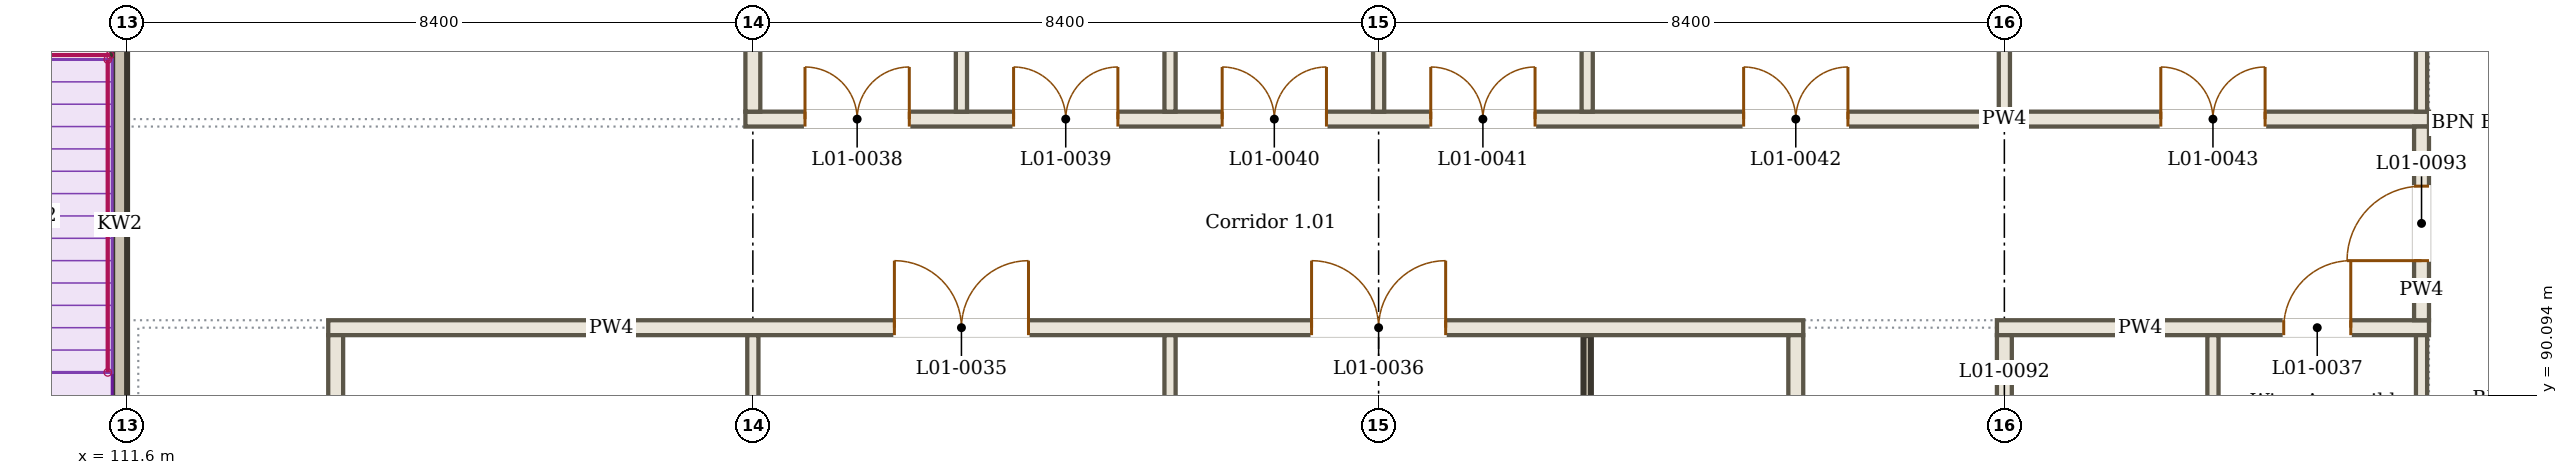
"""IFC4 building model, lengths in metres.
Left out: names, types, materials, properties, quantities, classifications, styles, units other than length and angle.
Written with IfcOpenShell. Run it as: python <this file> out.ifc"""

import sys

from ifc_helpers import new_model, si_unit, direction, frame, frame_2d, origin, place, context, subcontext, project, spatial, rectangle, extrude, element, fill, save


model = new_model("IFC4")
c1 = context("Model", 3, precision=1e-05, world=origin(), true_north=direction((0.0, 1.0)))
c2 = subcontext(c1, "Body", "Model", "MODEL_VIEW")
j1 = project(units=[si_unit("LENGTHUNIT", "METRE"), si_unit("PLANEANGLEUNIT", "RADIAN")], contexts=[c1])
p1 = place(None, origin())
s1 = spatial("IfcSite", under=j1, at=p1, CompositionType="ELEMENT")
p2 = place(p1, origin())
s2 = spatial("IfcBuilding", under=s1, at=p2, CompositionType="ELEMENT")
p3 = place(p2, frame((0.0, 0.0, 4.5)))
s3 = spatial("IfcBuildingStorey", under=s2, at=p3, CompositionType="ELEMENT", Elevation=4.5)
p4 = place(p3, frame((114.3, 91.0, 0.0), z_axis=(0.0, 0.0, 1.0), x_axis=(1.0, 0.0, 0.0)))
e1 = element("IfcWall", 1, at=p4, inside=s3, PredefinedType="PARTITIONING", context=c2, shape_type="SweptSolid", body=[
    extrude(rectangle(XDim=19.8, YDim=0.2, at=frame_2d((9.9, 0.0))), origin(), (0.0, 0.0, 1.0), 3.8),
])
p5 = place(p4, frame((7.6, 0.0, 0.0)))
e2 = element("IfcOpeningElement", 2, at=p5, cuts=e1, PredefinedType="OPENING", context=c2, shape_type="SweptSolid", body=[
    extrude(rectangle(XDim=1.8, YDim=2.1, at=frame_2d((0.9, 1.05))), frame((0.0, 0.11, 0.0), z_axis=(0.0, -1.0, 0.0), x_axis=(1.0, 0.0, 0.0)), (0.0, 0.0, 1.0), 0.22),
])
p6 = place(p4, frame((13.2, 0.0, 0.0)))
e3 = element("IfcOpeningElement", 3, at=p6, cuts=e1, PredefinedType="OPENING", context=c2, shape_type="SweptSolid", body=[
    extrude(rectangle(XDim=1.8, YDim=2.1, at=frame_2d((0.9, 1.05))), frame((0.0, 0.11, 0.0), z_axis=(0.0, -1.0, 0.0), x_axis=(1.0, 0.0, 0.0)), (0.0, 0.0, 1.0), 0.22),
])
p7 = place(p3, frame((136.7, 91.0, 0.0), z_axis=(0.0, 0.0, 1.0), x_axis=(1.0, 0.0, 0.0)))
e4 = element("IfcWall", 4, at=p7, inside=s3, PredefinedType="PARTITIONING", context=c2, shape_type="SweptSolid", body=[
    extrude(rectangle(XDim=5.8, YDim=0.2, at=frame_2d((2.9, 0.0))), origin(), (0.0, 0.0, 1.0), 3.8),
])
p8 = place(p7, frame((3.85, 0.0, 0.0)))
e5 = element("IfcOpeningElement", 5, at=p8, cuts=e4, PredefinedType="OPENING", context=c2, shape_type="SweptSolid", body=[
    extrude(rectangle(XDim=0.9, YDim=2.1, at=frame_2d((0.45, 1.05))), frame((0.0, 0.11, 0.0), z_axis=(0.0, -1.0, 0.0), x_axis=(1.0, 0.0, 0.0)), (0.0, 0.0, 1.0), 0.22),
])
p9 = place(p3, frame((119.9, 93.8, 0.0), z_axis=(0.0, 0.0, 1.0), x_axis=(1.0, 0.0, 0.0)))
e6 = element("IfcWall", 6, at=p9, inside=s3, PredefinedType="PARTITIONING", context=c2, shape_type="SweptSolid", body=[
    extrude(rectangle(XDim=22.6, YDim=0.2, at=frame_2d((11.3, 0.0))), origin(), (0.0, 0.0, 1.0), 3.8),
])
p10 = place(p9, frame((0.8, 0.0, 0.0)))
e7 = element("IfcOpeningElement", 7, at=p10, cuts=e6, PredefinedType="OPENING", context=c2, shape_type="SweptSolid", body=[
    extrude(rectangle(XDim=1.4, YDim=2.1, at=frame_2d((0.7, 1.05))), frame((0.0, 0.11, 0.0), z_axis=(0.0, -1.0, 0.0), x_axis=(1.0, 0.0, 0.0)), (0.0, 0.0, 1.0), 0.22),
])
p11 = place(p9, frame((3.6, 0.0, 0.0)))
e8 = element("IfcOpeningElement", 8, at=p11, cuts=e6, PredefinedType="OPENING", context=c2, shape_type="SweptSolid", body=[
    extrude(rectangle(XDim=1.4, YDim=2.1, at=frame_2d((0.7, 1.05))), frame((0.0, 0.11, 0.0), z_axis=(0.0, -1.0, 0.0), x_axis=(1.0, 0.0, 0.0)), (0.0, 0.0, 1.0), 0.22),
])
p12 = place(p9, frame((6.4, 0.0, 0.0)))
e9 = element("IfcOpeningElement", 9, at=p12, cuts=e6, PredefinedType="OPENING", context=c2, shape_type="SweptSolid", body=[
    extrude(rectangle(XDim=1.4, YDim=2.1, at=frame_2d((0.7, 1.05))), frame((0.0, 0.11, 0.0), z_axis=(0.0, -1.0, 0.0), x_axis=(1.0, 0.0, 0.0)), (0.0, 0.0, 1.0), 0.22),
])
p13 = place(p9, frame((9.2, 0.0, 0.0)))
e10 = element("IfcOpeningElement", 10, at=p13, cuts=e6, PredefinedType="OPENING", context=c2, shape_type="SweptSolid", body=[
    extrude(rectangle(XDim=1.4, YDim=2.1, at=frame_2d((0.7, 1.05))), frame((0.0, 0.11, 0.0), z_axis=(0.0, -1.0, 0.0), x_axis=(1.0, 0.0, 0.0)), (0.0, 0.0, 1.0), 0.22),
])
p14 = place(p9, frame((13.4, 0.0, 0.0)))
e11 = element("IfcOpeningElement", 11, at=p14, cuts=e6, PredefinedType="OPENING", context=c2, shape_type="SweptSolid", body=[
    extrude(rectangle(XDim=1.4, YDim=2.1, at=frame_2d((0.7, 1.05))), frame((0.0, 0.11, 0.0), z_axis=(0.0, -1.0, 0.0), x_axis=(1.0, 0.0, 0.0)), (0.0, 0.0, 1.0), 0.22),
])
p15 = place(p9, frame((19.0, 0.0, 0.0)))
e12 = element("IfcOpeningElement", 12, at=p15, cuts=e6, PredefinedType="OPENING", context=c2, shape_type="SweptSolid", body=[
    extrude(rectangle(XDim=1.4, YDim=2.1, at=frame_2d((0.7, 1.05))), frame((0.0, 0.11, 0.0), z_axis=(0.0, -1.0, 0.0), x_axis=(1.0, 0.0, 0.0)), (0.0, 0.0, 1.0), 0.22),
])
p16 = place(p3, frame((114.4, 79.95, 0.0), z_axis=(0.0, 0.0, 1.0), x_axis=(0.0, 1.0, 0.0)))
e13 = element("IfcWall", 13, at=p16, inside=s3, PredefinedType="PARTITIONING", context=c2, shape_type="SweptSolid", body=[
    extrude(rectangle(XDim=10.95, YDim=0.2, at=frame_2d((5.475, 0.0))), origin(), (0.0, 0.0, 1.0), 3.8),
])
p17 = place(p16, frame((4.95, 0.0, 0.0)))
e14 = element("IfcOpeningElement", 14, at=p17, cuts=e13, PredefinedType="OPENING", context=c2, shape_type="SweptSolid", body=[
    extrude(rectangle(XDim=1.0, YDim=2.1, at=frame_2d((0.5, 1.05))), frame((0.0, 0.11, 0.0), z_axis=(0.0, -1.0, 0.0), x_axis=(1.0, 0.0, 0.0)), (0.0, 0.0, 1.0), 0.22),
])
p18 = place(p3, frame((120.0, 88.397, 0.0), z_axis=(0.0, 0.0, 1.0), x_axis=(0.0, 1.0, 0.0)))
e15 = element("IfcWall", 15, at=p18, inside=s3, PredefinedType="PARTITIONING", context=c2, shape_type="SweptSolid", body=[
    extrude(rectangle(XDim=2.502, YDim=0.15, at=frame_2d((1.251, 0.0))), origin(), (0.0, 0.0, 1.0), 3.8),
])
p19 = place(p3, frame((120.0, 93.9, 0.0), z_axis=(0.0, 0.0, 1.0), x_axis=(0.0, 1.0, 0.0)))
e16 = element("IfcWall", 16, at=p19, inside=s3, PredefinedType="PARTITIONING", context=c2, shape_type="SweptSolid", body=[
    extrude(rectangle(XDim=2.7, YDim=0.2, at=frame_2d((1.35, 0.0))), origin(), (0.0, 0.0, 1.0), 3.8),
])
for number, where, z_axis, x_axis in (
    (17, (122.8, 93.9, 0.0), (0.0, 0.0, 1.0), (0.0, 1.0, 0.0)),
    (18, (125.6, 80.025, 0.0), (0.0, 0.0, 1.0), (0.0, 1.0, 0.0)),
    (19, (125.6, 93.9, 0.0), (0.0, 0.0, 1.0), (0.0, 1.0, 0.0)),
):
    element("IfcWall", number, at=place(p3, frame(where, z_axis=z_axis, x_axis=x_axis)), inside=s3, PredefinedType="PARTITIONING", context=c2, shape_type="SweptSolid", body=[
        extrude(rectangle(XDim=10.875, YDim=0.15, at=frame_2d((5.438, 0.0))), origin(), (0.0, 0.0, 1.0), 3.8),
    ])
p20 = place(p3, frame((128.4, 93.9, 0.0), z_axis=(0.0, 0.0, 1.0), x_axis=(0.0, 1.0, 0.0)))
e20 = element("IfcWall", 20, at=p20, inside=s3, PredefinedType="PARTITIONING", context=c2, shape_type="SweptSolid", body=[
    extrude(rectangle(XDim=2.503, YDim=0.15, at=frame_2d((1.251, 0.0))), origin(), (0.0, 0.0, 1.0), 3.8),
])
p21 = place(p3, frame((131.2, 79.95, 0.0), z_axis=(0.0, 0.0, 1.0), x_axis=(0.0, 1.0, 0.0)))
e21 = element("IfcWall", 21, at=p21, inside=s3, PredefinedType="SOLIDWALL", context=c2, shape_type="SweptSolid", body=[
    extrude(rectangle(XDim=10.95, YDim=0.1, at=frame_2d((5.475, 0.0))), origin(), (0.0, 0.0, 1.0), 3.8),
])
p22 = place(p3, frame((131.2, 93.9, 0.0), z_axis=(0.0, 0.0, 1.0), x_axis=(0.0, 1.0, 0.0)))
e22 = element("IfcWall", 22, at=p22, inside=s3, PredefinedType="PARTITIONING", context=c2, shape_type="SweptSolid", body=[
    extrude(rectangle(XDim=10.875, YDim=0.15, at=frame_2d((5.438, 0.0))), origin(), (0.0, 0.0, 1.0), 3.8),
])
p23 = place(p3, frame((134.0, 79.95, 0.0), z_axis=(0.0, 0.0, 1.0), x_axis=(0.0, 1.0, 0.0)))
e23 = element("IfcWall", 23, at=p23, inside=s3, PredefinedType="PARTITIONING", context=c2, shape_type="SweptSolid", body=[
    extrude(rectangle(XDim=10.95, YDim=0.2, at=frame_2d((5.475, 0.0))), origin(), (0.0, 0.0, 1.0), 3.8),
])
p24 = place(p23, frame((5.05, 0.0, 0.0)))
e24 = element("IfcOpeningElement", 24, at=p24, cuts=e23, PredefinedType="OPENING", context=c2, shape_type="SweptSolid", body=[
    extrude(rectangle(XDim=0.8, YDim=2.1, at=frame_2d((0.4, 1.05))), frame((0.0, 0.11, 0.0), z_axis=(0.0, -1.0, 0.0), x_axis=(1.0, 0.0, 0.0)), (0.0, 0.0, 1.0), 0.22),
])
p25 = place(p3, frame((136.8, 88.2, 0.0), z_axis=(0.0, 0.0, 1.0), x_axis=(0.0, 1.0, 0.0)))
e25 = element("IfcWall", 25, at=p25, inside=s3, PredefinedType="PARTITIONING", context=c2, shape_type="SweptSolid", body=[
    extrude(rectangle(XDim=2.7, YDim=0.2, at=frame_2d((1.35, 0.0))), origin(), (0.0, 0.0, 1.0), 3.8),
])
p26 = place(p25, frame((0.95, 0.0, 0.0)))
e26 = element("IfcOpeningElement", 26, at=p26, cuts=e25, PredefinedType="OPENING", context=c2, shape_type="SweptSolid", body=[
    extrude(rectangle(XDim=0.9, YDim=2.1, at=frame_2d((0.45, 1.05))), frame((0.0, 0.11, 0.0), z_axis=(0.0, -1.0, 0.0), x_axis=(1.0, 0.0, 0.0)), (0.0, 0.0, 1.0), 0.22),
])
p27 = place(p3, frame((136.8, 93.9, 0.0), z_axis=(0.0, 0.0, 1.0), x_axis=(0.0, 1.0, 0.0)))
e27 = element("IfcWall", 27, at=p27, inside=s3, PredefinedType="PARTITIONING", context=c2, shape_type="SweptSolid", body=[
    extrude(rectangle(XDim=2.503, YDim=0.15, at=frame_2d((1.251, 0.0))), origin(), (0.0, 0.0, 1.0), 3.8),
])
for number, where, z_axis, x_axis in (
    (28, (139.6, 88.2, 0.0), (0.0, 0.0, 1.0), (0.0, 1.0, 0.0)),
    (29, (142.4, 88.2, 0.0), (0.0, 0.0, 1.0), (0.0, 1.0, 0.0)),
):
    element("IfcWall", number, at=place(p3, frame(where, z_axis=z_axis, x_axis=x_axis)), inside=s3, PredefinedType="PARTITIONING", context=c2, shape_type="SweptSolid", body=[
        extrude(rectangle(XDim=2.7, YDim=0.15, at=frame_2d((1.35, 0.0))), origin(), (0.0, 0.0, 1.0), 3.95),
    ])
p28 = place(p3, frame((142.4, 91.1, 0.0), z_axis=(0.0, 0.0, 1.0), x_axis=(0.0, 1.0, 0.0)))
e30 = element("IfcWall", 30, at=p28, inside=s3, PredefinedType="PARTITIONING", context=c2, shape_type="SweptSolid", body=[
    extrude(rectangle(XDim=2.6, YDim=0.2, at=frame_2d((1.3, 0.0))), origin(), (0.0, 0.0, 1.0), 3.95),
])
p29 = place(p28, frame((0.8, 0.0, 0.0)))
e31 = element("IfcOpeningElement", 31, at=p29, cuts=e30, PredefinedType="OPENING", context=c2, shape_type="SweptSolid", body=[
    extrude(rectangle(XDim=1.0, YDim=2.1, at=frame_2d((0.5, 1.05))), frame((0.0, 0.11, 0.0), z_axis=(0.0, -1.0, 0.0), x_axis=(1.0, 0.0, 0.0)), (0.0, 0.0, 1.0), 0.22),
])
p30 = place(p3, frame((142.4, 93.9, 0.0), z_axis=(0.0, 0.0, 1.0), x_axis=(0.0, 1.0, 0.0)))
e32 = element("IfcWall", 32, at=p30, inside=s3, PredefinedType="PARTITIONING", context=c2, shape_type="SweptSolid", body=[
    extrude(rectangle(XDim=10.875, YDim=0.15, at=frame_2d((5.438, 0.0))), origin(), (0.0, 0.0, 1.0), 3.8),
])
p31 = place(p3, frame((111.5, 88.4, 0.0), z_axis=(0.0, 0.0, 1.0), x_axis=(0.0, 1.0, 0.0)))
e33 = element("IfcWall", 33, at=p31, inside=s3, PredefinedType="SOLIDWALL", context=c2, shape_type="SweptSolid", body=[
    extrude(rectangle(XDim=7.975, YDim=0.2, at=frame_2d((3.988, 0.0))), origin(), (0.0, 0.0, 1.0), 4.5),
])
p32 = place(p5, origin())
e34 = element("IfcDoor", 34, at=p32, inside=s3, OperationType="DOUBLE_DOOR_SINGLE_SWING", PredefinedType="DOOR", context=c2, shape_type="SweptSolid", body=[
    extrude(rectangle(XDim=1.8, YDim=2.1, at=frame_2d((0.9, 1.05))), frame((0.0, 0.025, 0.0), z_axis=(0.0, -1.0, 0.0), x_axis=(1.0, 0.0, 0.0)), (0.0, 0.0, 1.0), 0.05),
])
fill(e2, e34)
p33 = place(p6, origin())
e35 = element("IfcDoor", 35, at=p33, inside=s3, OperationType="DOUBLE_DOOR_SINGLE_SWING", PredefinedType="DOOR", context=c2, shape_type="SweptSolid", body=[
    extrude(rectangle(XDim=1.8, YDim=2.1, at=frame_2d((0.9, 1.05))), frame((0.0, 0.025, 0.0), z_axis=(0.0, -1.0, 0.0), x_axis=(1.0, 0.0, 0.0)), (0.0, 0.0, 1.0), 0.05),
])
fill(e3, e35)
p34 = place(p8, origin())
e36 = element("IfcDoor", 36, at=p34, inside=s3, OperationType="SINGLE_SWING_RIGHT", PredefinedType="DOOR", context=c2, shape_type="SweptSolid", body=[
    extrude(rectangle(XDim=0.9, YDim=2.1, at=frame_2d((0.45, 1.05))), frame((0.0, 0.025, 0.0), z_axis=(0.0, -1.0, 0.0), x_axis=(1.0, 0.0, 0.0)), (0.0, 0.0, 1.0), 0.05),
])
fill(e5, e36)
p35 = place(p10, origin())
e37 = element("IfcDoor", 37, at=p35, inside=s3, OperationType="DOUBLE_DOOR_SINGLE_SWING", PredefinedType="DOOR", context=c2, shape_type="SweptSolid", body=[
    extrude(rectangle(XDim=1.4, YDim=2.1, at=frame_2d((0.7, 1.05))), frame((0.0, 0.025, 0.0), z_axis=(0.0, -1.0, 0.0), x_axis=(1.0, 0.0, 0.0)), (0.0, 0.0, 1.0), 0.05),
])
fill(e7, e37)
p36 = place(p11, origin())
e38 = element("IfcDoor", 38, at=p36, inside=s3, OperationType="DOUBLE_DOOR_SINGLE_SWING", PredefinedType="DOOR", context=c2, shape_type="SweptSolid", body=[
    extrude(rectangle(XDim=1.4, YDim=2.1, at=frame_2d((0.7, 1.05))), frame((0.0, 0.025, 0.0), z_axis=(0.0, -1.0, 0.0), x_axis=(1.0, 0.0, 0.0)), (0.0, 0.0, 1.0), 0.05),
])
fill(e8, e38)
p37 = place(p12, origin())
e39 = element("IfcDoor", 39, at=p37, inside=s3, OperationType="DOUBLE_DOOR_SINGLE_SWING", PredefinedType="DOOR", context=c2, shape_type="SweptSolid", body=[
    extrude(rectangle(XDim=1.4, YDim=2.1, at=frame_2d((0.7, 1.05))), frame((0.0, 0.025, 0.0), z_axis=(0.0, -1.0, 0.0), x_axis=(1.0, 0.0, 0.0)), (0.0, 0.0, 1.0), 0.05),
])
fill(e9, e39)
p38 = place(p13, origin())
e40 = element("IfcDoor", 40, at=p38, inside=s3, OperationType="DOUBLE_DOOR_SINGLE_SWING", PredefinedType="DOOR", context=c2, shape_type="SweptSolid", body=[
    extrude(rectangle(XDim=1.4, YDim=2.1, at=frame_2d((0.7, 1.05))), frame((0.0, 0.025, 0.0), z_axis=(0.0, -1.0, 0.0), x_axis=(1.0, 0.0, 0.0)), (0.0, 0.0, 1.0), 0.05),
])
fill(e10, e40)
p39 = place(p14, origin())
e41 = element("IfcDoor", 41, at=p39, inside=s3, OperationType="DOUBLE_DOOR_SINGLE_SWING", PredefinedType="DOOR", context=c2, shape_type="SweptSolid", body=[
    extrude(rectangle(XDim=1.4, YDim=2.1, at=frame_2d((0.7, 1.05))), frame((0.0, 0.025, 0.0), z_axis=(0.0, -1.0, 0.0), x_axis=(1.0, 0.0, 0.0)), (0.0, 0.0, 1.0), 0.05),
])
fill(e11, e41)
p40 = place(p15, origin())
e42 = element("IfcDoor", 42, at=p40, inside=s3, OperationType="DOUBLE_DOOR_SINGLE_SWING", PredefinedType="DOOR", context=c2, shape_type="SweptSolid", body=[
    extrude(rectangle(XDim=1.4, YDim=2.1, at=frame_2d((0.7, 1.05))), frame((0.0, 0.025, 0.0), z_axis=(0.0, -1.0, 0.0), x_axis=(1.0, 0.0, 0.0)), (0.0, 0.0, 1.0), 0.05),
])
fill(e12, e42)
p41 = place(p29, origin())
e43 = element("IfcDoor", 43, at=p41, inside=s3, OperationType="SINGLE_SWING_LEFT", PredefinedType="DOOR", context=c2, shape_type="SweptSolid", body=[
    extrude(rectangle(XDim=1.0, YDim=2.1, at=frame_2d((0.5, 1.05))), frame((0.0, 0.025, 0.0), z_axis=(0.0, -1.0, 0.0), x_axis=(1.0, 0.0, 0.0)), (0.0, 0.0, 1.0), 0.05),
])
fill(e31, e43)
save(model, sys.argv[1])
